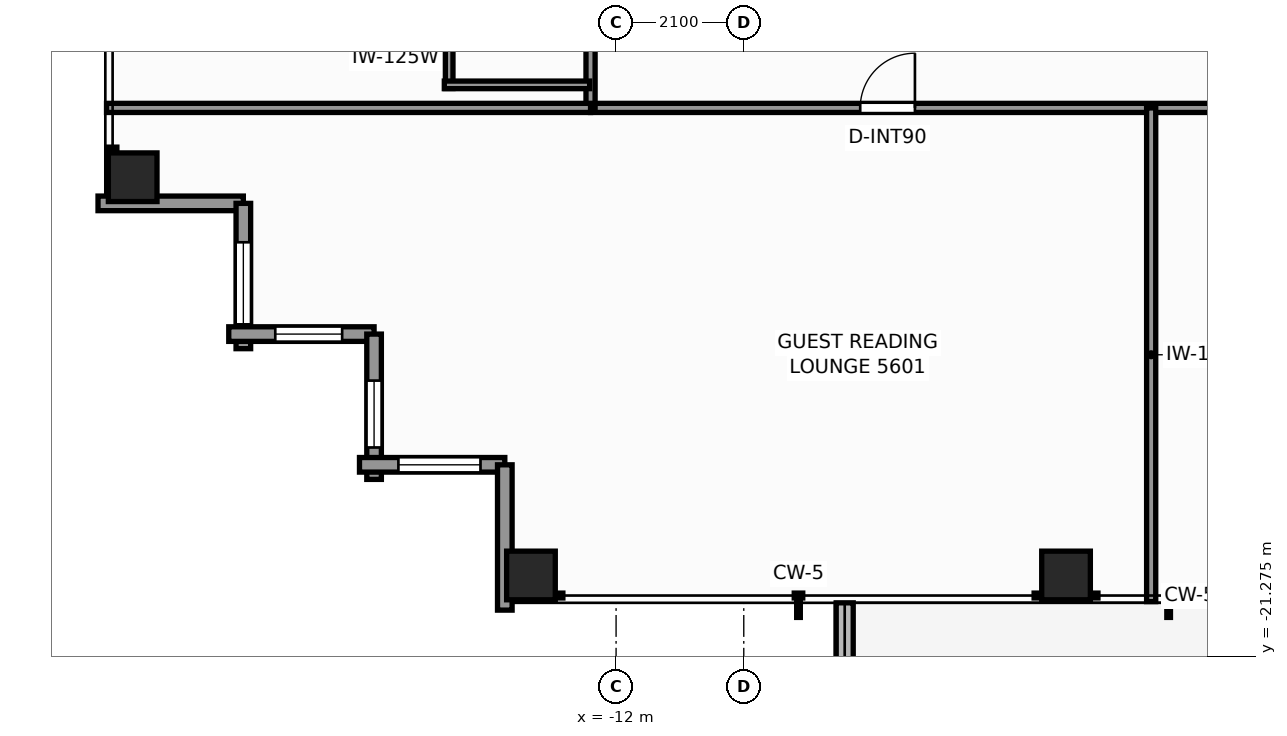
"""IFC4 building model, lengths in metres.
Left out: names, types, materials, properties, quantities, classifications, styles, units other than length and angle.
Written with IfcOpenShell. Run it as: python <this file> out.ifc"""

import sys

from ifc_helpers import new_model, si_unit, direction, frame, frame_2d, origin, origin_2d, place, context, subcontext, project, spatial, rectangle, extrude, element, fill, save


model = new_model("IFC4")
c1 = context("Model", 3, precision=1e-05, world=origin(), true_north=direction((0.0, 1.0)))
c2 = subcontext(c1, "Body", "Model", "MODEL_VIEW")
j1 = project(units=[si_unit("LENGTHUNIT", "METRE"), si_unit("PLANEANGLEUNIT", "RADIAN")], contexts=[c1])
p1 = place(None, origin())
s1 = spatial("IfcSite", under=j1, at=p1, CompositionType="ELEMENT")
p2 = place(p1, origin())
s2 = spatial("IfcBuilding", under=s1, at=p2, CompositionType="ELEMENT")
p3 = place(p2, frame((0.0, 0.0, 193.2)))
s3 = spatial("IfcBuildingStorey", under=s2, at=p3, CompositionType="ELEMENT", Elevation=193.2)
for number, where, z_axis, x_axis in (
    (1, (-13.4, -19.95, 0.0), (0.0, 0.0, 1.0), (1.0, 0.0, 0.0)),
    (2, (-4.6, -19.95, 0.0), (0.0, 0.0, 1.0), (1.0, 0.0, 0.0)),
    (3, (-19.95, -13.4, 0.0), (0.0, 0.0, 1.0), (1.0, 0.0, 0.0)),
):
    element("IfcColumn", number, at=place(p3, frame(where, z_axis=z_axis, x_axis=x_axis)), inside=s3, PredefinedType="COLUMN", context=c2, shape_type="SweptSolid", body=[
        extrude(rectangle(XDim=0.8, YDim=0.8, at=origin_2d()), origin(), (0.0, 0.0, 1.0), 3.3),
    ])
p4 = place(p3, frame((-8.24, -20.4, -0.04), z_axis=(0.0, 0.0, 1.0), x_axis=(0.0, -1.0, 0.0)))
e4 = element("IfcWall", 4, at=p4, inside=s3, PredefinedType="PARAPET", context=c2, shape_type="SweptSolid", body=[
    extrude(rectangle(XDim=2.674, YDim=0.28, at=frame_2d((1.337, 0.0))), origin(), (0.0, 0.0, 1.0), 0.42),
])
p5 = place(p3, frame((-18.13, -13.83, 0.0), z_axis=(0.0, 0.0, 1.0), x_axis=(-1.0, 0.0, 0.0)))
e5 = element("IfcWall", 5, at=p5, inside=s3, PredefinedType="STANDARD", context=c2, shape_type="SweptSolid", body=[
    extrude(rectangle(XDim=2.39, YDim=0.24, at=frame_2d((1.195, 0.0))), origin(), (0.0, 0.0, 1.0), 2.463),
])
p6 = place(p3, frame((-18.13, -16.22, 0.0), z_axis=(0.0, 0.0, 1.0), x_axis=(0.0, 1.0, 0.0)))
e6 = element("IfcWall", 6, at=p6, inside=s3, PredefinedType="STANDARD", context=c2, shape_type="SweptSolid", body=[
    extrude(rectangle(XDim=2.39, YDim=0.24, at=frame_2d((1.195, 0.0))), origin(), (0.0, 0.0, 1.0), 2.463),
])
p7 = place(p6, frame((0.4, 0.0, 0.65)))
e7 = element("IfcOpeningElement", 7, at=p7, cuts=e6, PredefinedType="OPENING", context=c2, shape_type="SweptSolid", body=[
    extrude(rectangle(XDim=1.35, YDim=1.55, at=frame_2d((0.675, 0.775))), frame((0.0, 0.13, 0.0), z_axis=(0.0, -1.0, 0.0), x_axis=(1.0, 0.0, 0.0)), (0.0, 0.0, 1.0), 0.26),
])
p8 = place(p3, frame((-15.98, -15.98, 0.0), z_axis=(0.0, 0.0, 1.0), x_axis=(-1.0, 0.0, 0.0)))
e8 = element("IfcWall", 8, at=p8, inside=s3, PredefinedType="STANDARD", context=c2, shape_type="SweptSolid", body=[
    extrude(rectangle(XDim=2.39, YDim=0.24, at=frame_2d((1.195, 0.0))), origin(), (0.0, 0.0, 1.0), 2.463),
])
p9 = place(p8, frame((0.525, 0.0, 0.65)))
e9 = element("IfcOpeningElement", 9, at=p9, cuts=e8, PredefinedType="OPENING", context=c2, shape_type="SweptSolid", body=[
    extrude(rectangle(XDim=1.1, YDim=1.45, at=frame_2d((0.55, 0.725))), frame((0.0, 0.13, 0.0), z_axis=(0.0, -1.0, 0.0), x_axis=(1.0, 0.0, 0.0)), (0.0, 0.0, 1.0), 0.26),
])
p10 = place(p3, frame((-15.98, -18.37, 0.0), z_axis=(0.0, 0.0, 1.0), x_axis=(0.0, 1.0, 0.0)))
e10 = element("IfcWall", 10, at=p10, inside=s3, PredefinedType="STANDARD", context=c2, shape_type="SweptSolid", body=[
    extrude(rectangle(XDim=2.39, YDim=0.24, at=frame_2d((1.195, 0.0))), origin(), (0.0, 0.0, 1.0), 2.463),
])
p11 = place(p10, frame((0.525, 0.0, 0.65)))
e11 = element("IfcOpeningElement", 11, at=p11, cuts=e10, PredefinedType="OPENING", context=c2, shape_type="SweptSolid", body=[
    extrude(rectangle(XDim=1.1, YDim=1.45, at=frame_2d((0.55, 0.725))), frame((0.0, 0.13, 0.0), z_axis=(0.0, -1.0, 0.0), x_axis=(1.0, 0.0, 0.0)), (0.0, 0.0, 1.0), 0.26),
])
p12 = place(p3, frame((-13.83, -18.13, 0.0), z_axis=(0.0, 0.0, 1.0), x_axis=(-1.0, 0.0, 0.0)))
e12 = element("IfcWall", 12, at=p12, inside=s3, PredefinedType="STANDARD", context=c2, shape_type="SweptSolid", body=[
    extrude(rectangle(XDim=2.39, YDim=0.24, at=frame_2d((1.195, 0.0))), origin(), (0.0, 0.0, 1.0), 2.463),
])
p13 = place(p12, frame((0.4, 0.0, 0.65)))
e13 = element("IfcOpeningElement", 13, at=p13, cuts=e12, PredefinedType="OPENING", context=c2, shape_type="SweptSolid", body=[
    extrude(rectangle(XDim=1.35, YDim=1.55, at=frame_2d((0.675, 0.775))), frame((0.0, 0.13, 0.0), z_axis=(0.0, -1.0, 0.0), x_axis=(1.0, 0.0, 0.0)), (0.0, 0.0, 1.0), 0.26),
])
p14 = place(p3, frame((-13.83, -20.52, 0.0), z_axis=(0.0, 0.0, 1.0), x_axis=(0.0, 1.0, 0.0)))
e14 = element("IfcWall", 14, at=p14, inside=s3, PredefinedType="STANDARD", context=c2, shape_type="SweptSolid", body=[
    extrude(rectangle(XDim=2.39, YDim=0.24, at=frame_2d((1.195, 0.0))), origin(), (0.0, 0.0, 1.0), 2.463),
])
p15 = place(p3, frame((-12.42, -12.26, 0.0), z_axis=(0.0, 0.0, 1.0), x_axis=(1.0, 0.0, 0.0)))
e15 = element("IfcWall", 15, at=p15, inside=s3, PredefinedType="PARTITIONING", context=c2, shape_type="SweptSolid", body=[
    extrude(rectangle(XDim=24.84, YDim=0.15, at=frame_2d((12.42, 0.0))), origin(), (0.0, 0.0, 1.0), 2.369),
])
p16 = place(p15, frame((4.435, 0.0, 0.0)))
e16 = element("IfcOpeningElement", 16, at=p16, cuts=e15, PredefinedType="OPENING", context=c2, shape_type="SweptSolid", body=[
    extrude(rectangle(XDim=0.9, YDim=2.06, at=frame_2d((0.45, 1.03))), frame((0.0, 0.085, 0.0), z_axis=(0.0, -1.0, 0.0), x_axis=(1.0, 0.0, 0.0)), (0.0, 0.0, 1.0), 0.17),
])
p17 = place(p15, frame((19.505, 0.0, 0.0)))
e17 = element("IfcOpeningElement", 17, at=p17, cuts=e15, PredefinedType="OPENING", context=c2, shape_type="SweptSolid", body=[
    extrude(rectangle(XDim=0.9, YDim=2.06, at=frame_2d((0.45, 1.03))), frame((0.0, 0.085, 0.0), z_axis=(0.0, -1.0, 0.0), x_axis=(1.0, 0.0, 0.0)), (0.0, 0.0, 1.0), 0.17),
])
p18 = place(p3, frame((-12.42, -12.26, 0.0), z_axis=(0.0, 0.0, 1.0), x_axis=(0.0, 1.0, 0.0)))
e18 = element("IfcWall", 18, at=p18, inside=s3, PredefinedType="PARTITIONING", context=c2, shape_type="SweptSolid", body=[
    extrude(rectangle(XDim=24.84, YDim=0.15, at=frame_2d((12.42, 0.0))), origin(), (0.0, 0.0, 1.0), 2.369),
])
p19 = place(p18, frame((3.573, 0.0, 0.0)))
e19 = element("IfcOpeningElement", 19, at=p19, cuts=e18, PredefinedType="OPENING", context=c2, shape_type="SweptSolid", body=[
    extrude(rectangle(XDim=0.95, YDim=2.06, at=frame_2d((0.475, 1.03))), frame((0.0, 0.085, 0.0), z_axis=(0.0, -1.0, 0.0), x_axis=(1.0, 0.0, 0.0)), (0.0, 0.0, 1.0), 0.17),
])
p20 = place(p18, frame((9.755, 0.0, 0.0)))
e20 = element("IfcOpeningElement", 20, at=p20, cuts=e18, PredefinedType="OPENING", context=c2, shape_type="SweptSolid", body=[
    extrude(rectangle(XDim=0.95, YDim=2.06, at=frame_2d((0.475, 1.03))), frame((0.0, 0.085, 0.0), z_axis=(0.0, -1.0, 0.0), x_axis=(1.0, 0.0, 0.0)), (0.0, 0.0, 1.0), 0.17),
])
p21 = place(p18, frame((19.32, 0.0, 0.0)))
e21 = element("IfcOpeningElement", 21, at=p21, cuts=e18, PredefinedType="OPENING", context=c2, shape_type="SweptSolid", body=[
    extrude(rectangle(XDim=0.95, YDim=2.06, at=frame_2d((0.475, 1.03))), frame((0.0, 0.085, 0.0), z_axis=(0.0, -1.0, 0.0), x_axis=(1.0, 0.0, 0.0)), (0.0, 0.0, 1.0), 0.17),
])
p22 = place(p3, frame((-20.38, -12.26, 0.0), z_axis=(0.0, 0.0, 1.0), x_axis=(1.0, 0.0, 0.0)))
e22 = element("IfcWall", 22, at=p22, inside=s3, PredefinedType="PARTITIONING", context=c2, shape_type="SweptSolid", body=[
    extrude(rectangle(XDim=7.96, YDim=0.15, at=frame_2d((3.98, 0.0))), origin(), (0.0, 0.0, 1.0), 2.369),
])
p23 = place(p3, frame((-3.2, -20.38, 0.0), z_axis=(0.0, 0.0, 1.0), x_axis=(0.0, 1.0, 0.0)))
e23 = element("IfcWall", 23, at=p23, inside=s3, PredefinedType="PARTITIONING", context=c2, shape_type="SweptSolid", body=[
    extrude(rectangle(XDim=8.12, YDim=0.15, at=frame_2d((4.06, 0.0))), origin(), (0.0, 0.0, 1.0), 2.369),
])
p24 = place(p3, frame((-14.745, -11.941, 0.0), z_axis=(0.0, 0.0, 1.0), x_axis=(0.0, 1.0, 0.0)))
e24 = element("IfcWall", 24, at=p24, inside=s3, PredefinedType="PARTITIONING", context=c2, shape_type="SweptSolid", body=[
    extrude(rectangle(XDim=2.77, YDim=0.125, at=frame_2d((1.385, 0.0))), origin(), (0.0, 0.0, 1.0), 2.369),
])
p25 = place(p3, frame((-14.825, -11.881, 0.0), z_axis=(0.0, 0.0, 1.0), x_axis=(1.0, 0.0, 0.0)))
e25 = element("IfcWall", 25, at=p25, inside=s3, PredefinedType="PARTITIONING", context=c2, shape_type="SweptSolid", body=[
    extrude(rectangle(XDim=2.39, YDim=0.125, at=frame_2d((1.195, 0.0))), origin(), (0.0, 0.0, 1.0), 3.08),
])
p26 = place(p7, origin())
e26 = element("IfcWindow", 26, at=p26, inside=s3, PartitioningType="SINGLE_PANEL", PredefinedType="WINDOW", context=c2, shape_type="SweptSolid", body=[
    extrude(rectangle(XDim=1.35, YDim=1.55, at=frame_2d((0.675, 0.775))), frame((0.0, 0.03, 0.0), z_axis=(0.0, -1.0, 0.0), x_axis=(1.0, 0.0, 0.0)), (0.0, 0.0, 1.0), 0.06),
])
fill(e7, e26)
p27 = place(p9, origin())
e27 = element("IfcWindow", 27, at=p27, inside=s3, PartitioningType="SINGLE_PANEL", PredefinedType="WINDOW", context=c2, shape_type="SweptSolid", body=[
    extrude(rectangle(XDim=1.1, YDim=1.45, at=frame_2d((0.55, 0.725))), frame((0.0, 0.03, 0.0), z_axis=(0.0, -1.0, 0.0), x_axis=(1.0, 0.0, 0.0)), (0.0, 0.0, 1.0), 0.06),
])
fill(e9, e27)
p28 = place(p11, origin())
e28 = element("IfcWindow", 28, at=p28, inside=s3, PartitioningType="SINGLE_PANEL", PredefinedType="WINDOW", context=c2, shape_type="SweptSolid", body=[
    extrude(rectangle(XDim=1.1, YDim=1.45, at=frame_2d((0.55, 0.725))), frame((0.0, 0.03, 0.0), z_axis=(0.0, -1.0, 0.0), x_axis=(1.0, 0.0, 0.0)), (0.0, 0.0, 1.0), 0.06),
])
fill(e11, e28)
p29 = place(p13, origin())
e29 = element("IfcWindow", 29, at=p29, inside=s3, PartitioningType="SINGLE_PANEL", PredefinedType="WINDOW", context=c2, shape_type="SweptSolid", body=[
    extrude(rectangle(XDim=1.35, YDim=1.55, at=frame_2d((0.675, 0.775))), frame((0.0, 0.03, 0.0), z_axis=(0.0, -1.0, 0.0), x_axis=(1.0, 0.0, 0.0)), (0.0, 0.0, 1.0), 0.06),
])
fill(e13, e29)
p30 = place(p16, origin())
e30 = element("IfcDoor", 30, at=p30, inside=s3, OperationType="SINGLE_SWING_RIGHT", PredefinedType="DOOR", context=c2, shape_type="SweptSolid", body=[
    extrude(rectangle(XDim=0.9, YDim=2.06, at=frame_2d((0.45, 1.03))), frame((0.0, 0.025, 0.0), z_axis=(0.0, -1.0, 0.0), x_axis=(1.0, 0.0, 0.0)), (0.0, 0.0, 1.0), 0.05),
])
fill(e16, e30)
save(model, sys.argv[1])
